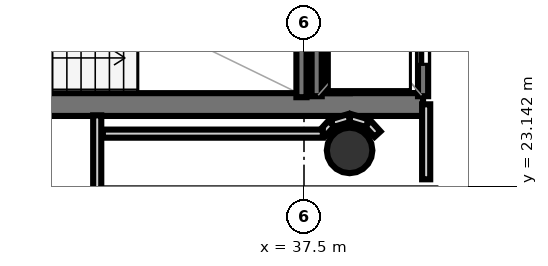
"""IFC4 building model, lengths in metres.
Left out: names, types, materials, properties, quantities, classifications, styles, units other than length and angle.
Written with IfcOpenShell. Run it as: python <this file> out.ifc"""

import sys

from ifc_helpers import new_model, si_unit, direction, frame, frame_2d, origin, origin_2d, place, context, subcontext, project, spatial, rectangle, hollow_circle, extrude, element, fill, save


model = new_model("IFC4")
c1 = context("Model", 3, precision=1e-05, world=origin(), true_north=direction((0.0, 1.0)))
c2 = subcontext(c1, "Body", "Model", "MODEL_VIEW")
j1 = project(units=[si_unit("LENGTHUNIT", "METRE"), si_unit("PLANEANGLEUNIT", "RADIAN")], contexts=[c1])
p1 = place(None, origin())
s1 = spatial("IfcSite", under=j1, at=p1, CompositionType="ELEMENT")
p2 = place(p1, origin())
s2 = spatial("IfcBuilding", under=s1, at=p2, CompositionType="ELEMENT")
p3 = place(p2, frame((0.0, 0.0, 280.6)))
s3 = spatial("IfcBuildingStorey", under=s2, at=p3, CompositionType="ELEMENT", Elevation=280.6)
p4 = place(p3, frame((29.33, 24.755, 0.0), z_axis=(0.0, 0.0, 1.0), x_axis=(1.0, 0.0, 0.0)))
e1 = element("IfcWall", 1, at=p4, inside=s3, PredefinedType="SHEAR", context=c2, shape_type="SweptSolid", body=[
    extrude(rectangle(XDim=10.52, YDim=0.45, at=frame_2d((5.26, 0.0))), origin(), (0.0, 0.0, 1.0), 3.52),
])
p5 = place(p4, frame((0.695, 0.0, 0.0)))
e2 = element("IfcOpeningElement", 2, at=p5, cuts=e1, PredefinedType="OPENING", context=c2, shape_type="SweptSolid", body=[
    extrude(rectangle(XDim=1.25, YDim=2.15, at=frame_2d((0.625, 1.075))), frame((0.0, 0.235, 0.0), z_axis=(0.0, -1.0, 0.0), x_axis=(1.0, 0.0, 0.0)), (0.0, 0.0, 1.0), 0.47),
])
p6 = place(p3, frame((38.18, 24.98, 0.0), z_axis=(0.0, 0.0, 1.0), x_axis=(0.0, 1.0, 0.0)))
e3 = element("IfcWall", 3, at=p6, inside=s3, PredefinedType="SHEAR", context=c2, shape_type="SweptSolid", body=[
    extrude(rectangle(XDim=7.44, YDim=0.45, at=frame_2d((3.72, 0.0))), origin(), (0.0, 0.0, 1.0), 3.52),
])
p7 = place(p3, frame((38.4, 23.85, 0.0), z_axis=(0.0, 0.0, 1.0), x_axis=(1.0, 0.0, 0.0)))
e4 = element("IfcColumn", 4, at=p7, inside=s3, PredefinedType="COLUMN", context=c2, shape_type="SweptSolid", body=[
    extrude(hollow_circle(Radius=0.45, WallThickness=0.025, at=origin_2d()), origin(), (0.0, 0.0, 1.0), 3.7),
])
p8 = place(p3, frame((37.45, 24.9, 0.0), z_axis=(0.0, 0.0, 1.0), x_axis=(0.0, 1.0, 0.0)))
e5 = element("IfcWall", 5, at=p8, inside=s3, PredefinedType="SOLIDWALL", context=c2, shape_type="SweptSolid", body=[
    extrude(rectangle(XDim=3.06, YDim=0.2, at=frame_2d((1.53, 0.0))), origin(), (0.0, 0.0, 1.0), 3.52),
])
p9 = place(p3, frame((39.85, 24.92, 0.0), z_axis=(0.0, 0.0, 1.0), x_axis=(0.0, 1.0, 0.0)))
e6 = element("IfcWall", 6, at=p9, inside=s3, PredefinedType="SOLIDWALL", context=c2, shape_type="SweptSolid", body=[
    extrude(rectangle(XDim=2.36, YDim=0.2, at=frame_2d((1.18, 0.0))), origin(), (0.0, 0.0, 1.0), 3.52),
])
p10 = place(p9, frame((0.63, 0.0, 0.0)))
e7 = element("IfcOpeningElement", 7, at=p10, cuts=e6, PredefinedType="OPENING", context=c2, shape_type="SweptSolid", body=[
    extrude(rectangle(XDim=1.1, YDim=2.15, at=frame_2d((0.55, 1.075))), frame((0.0, 0.11, 0.0), z_axis=(0.0, -1.0, 0.0), x_axis=(1.0, 0.0, 0.0)), (0.0, 0.0, 1.0), 0.22),
])
p11 = place(p3, frame((37.75, 24.92, 0.0), z_axis=(0.0, 0.0, 1.0), x_axis=(0.0, 1.0, 0.0)))
e8 = element("IfcWall", 8, at=p11, inside=s3, PredefinedType="SOLIDWALL", context=c2, shape_type="SweptSolid", body=[
    extrude(rectangle(XDim=2.36, YDim=0.2, at=frame_2d((1.18, 0.0))), origin(), (0.0, 0.0, 1.0), 3.52),
])
p12 = place(p3, frame((33.419, 24.542, 0.0), z_axis=(0.0, 0.0, 1.0), x_axis=(0.0, -1.0, 0.0)))
e9 = element("IfcWall", 9, at=p12, inside=s3, PredefinedType="PARTITIONING", context=c2, shape_type="SweptSolid", body=[
    extrude(rectangle(XDim=2.692, YDim=0.16, at=frame_2d((1.346, 0.0))), origin(), (0.0, 0.0, 1.0), 2.84),
])
p13 = place(p3, frame((39.911, 23.28, 0.0), z_axis=(0.0, 0.0, 1.0), x_axis=(0.0, 1.0, 0.0)))
e10 = element("IfcWall", 10, at=p13, inside=s3, PredefinedType="PARTITIONING", context=c2, shape_type="SweptSolid", body=[
    extrude(rectangle(XDim=1.48, YDim=0.16, at=frame_2d((0.74, 0.0))), origin(), (0.0, 0.0, 1.0), 2.84),
])
p14 = place(p3, frame((38.951, 24.171, 0.0), z_axis=(0.0, 0.0, 1.0), x_axis=(-0.674186852077, 0.738560822469, 0.0)))
e11 = element("IfcWall", 11, at=p14, inside=s3, PredefinedType="PARTITIONING", context=c2, shape_type="SweptSolid", body=[
    extrude(rectangle(XDim=0.281, YDim=0.16, at=frame_2d((0.14, 0.0))), origin(), (0.0, 0.0, 1.0), 2.84),
])
p15 = place(p3, frame((38.748, 24.387, 0.0), z_axis=(0.0, 0.0, 1.0), x_axis=(-0.956948991291, 0.290256142171, 0.0)))
e12 = element("IfcWall", 12, at=p15, inside=s3, PredefinedType="PARTITIONING", context=c2, shape_type="SweptSolid", body=[
    extrude(rectangle(XDim=0.354, YDim=0.16, at=frame_2d((0.177, 0.0))), origin(), (0.0, 0.0, 1.0), 2.84),
])
p16 = place(p3, frame((38.391, 24.49, 0.0), z_axis=(0.0, 0.0, 1.0), x_axis=(-0.957007018611, -0.290064762301, 0.0)))
e13 = element("IfcWall", 13, at=p16, inside=s3, PredefinedType="PARTITIONING", context=c2, shape_type="SweptSolid", body=[
    extrude(rectangle(XDim=0.354, YDim=0.16, at=frame_2d((0.177, 0.0))), origin(), (0.0, 0.0, 1.0), 2.84),
])
p17 = place(p3, frame((38.038, 24.378, 0.0), z_axis=(0.0, 0.0, 1.0), x_axis=(-0.673658387955, -0.739042878551, 0.0)))
e14 = element("IfcWall", 14, at=p17, inside=s3, PredefinedType="PARTITIONING", context=c2, shape_type="SweptSolid", body=[
    extrude(rectangle(XDim=0.246, YDim=0.16, at=frame_2d((0.123, 0.0))), origin(), (0.0, 0.0, 1.0), 2.84),
])
p18 = place(p3, frame((37.872, 24.181, 0.0), z_axis=(0.0, 0.0, 1.0), x_axis=(-1.0, 0.0, 0.0)))
e15 = element("IfcWall", 15, at=p18, inside=s3, PredefinedType="PARTITIONING", context=c2, shape_type="SweptSolid", body=[
    extrude(rectangle(XDim=4.342, YDim=0.16, at=frame_2d((2.171, 0.0))), origin(), (0.0, 0.0, 1.0), 2.84),
])
p19 = place(p10, origin())
e16 = element("IfcDoor", 16, at=p19, inside=s3, OperationType="SLIDING_TO_LEFT", PredefinedType="DOOR", context=c2, shape_type="SweptSolid", body=[
    extrude(rectangle(XDim=1.1, YDim=2.15, at=frame_2d((0.55, 1.075))), frame((0.0, 0.025, 0.0), z_axis=(0.0, -1.0, 0.0), x_axis=(1.0, 0.0, 0.0)), (0.0, 0.0, 1.0), 0.05),
])
fill(e7, e16)
save(model, sys.argv[1])
